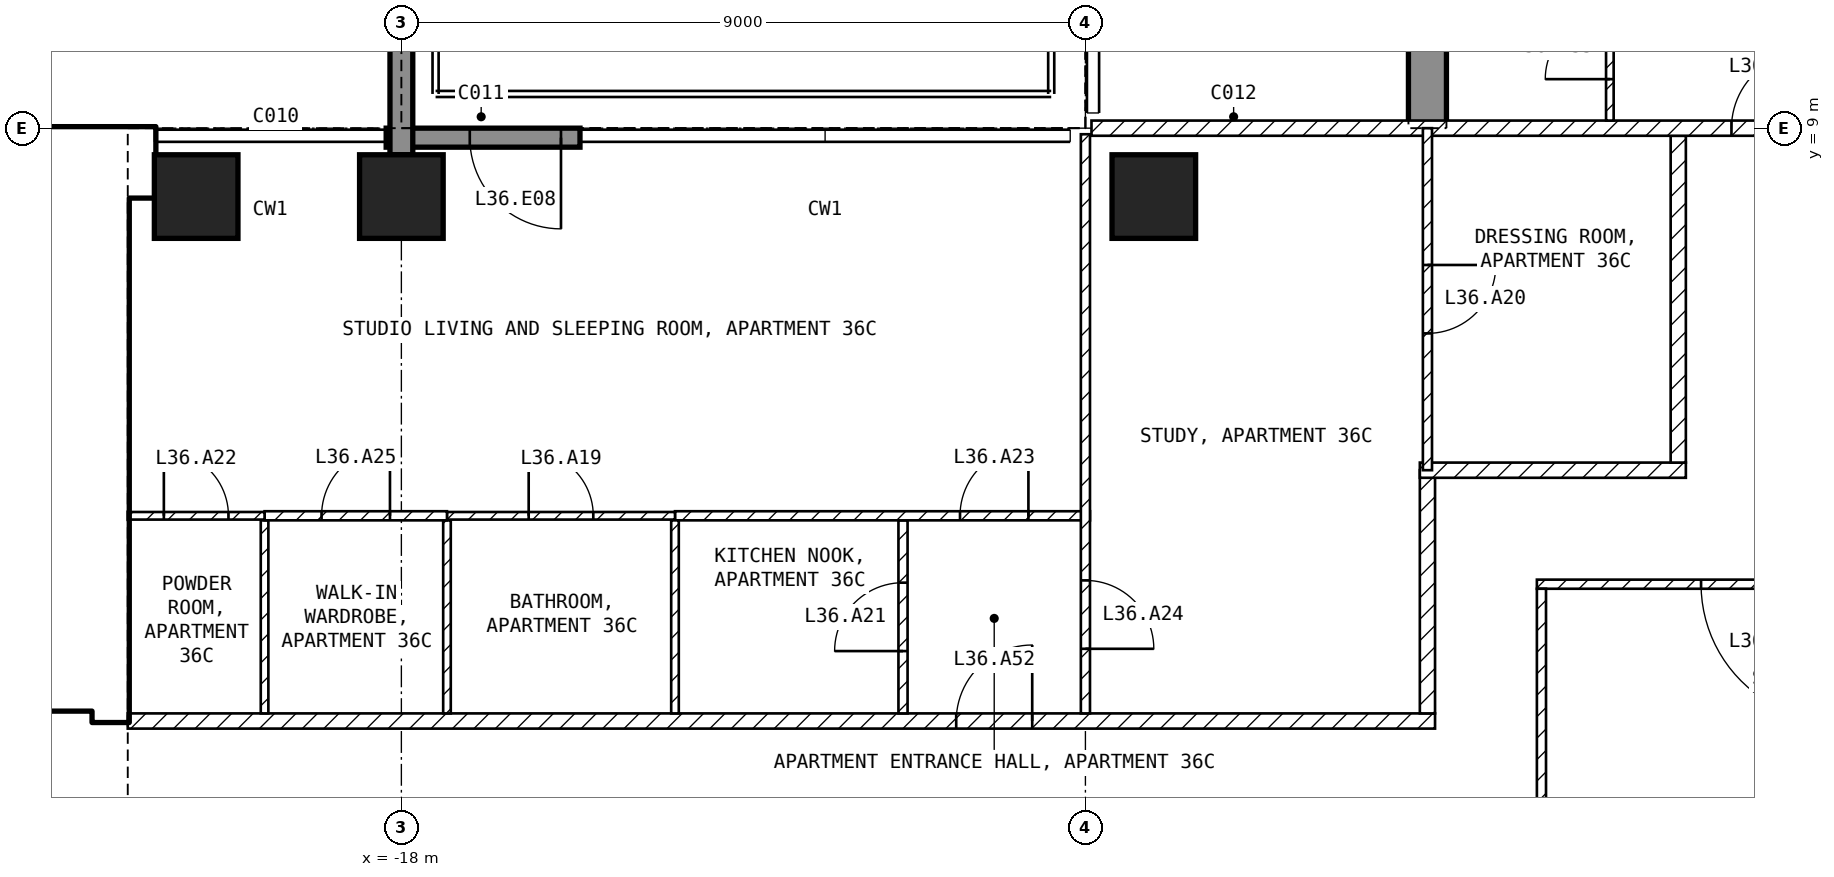
"""IFC4 building model, lengths in metres.
Left out: names, types, materials, properties, quantities, classifications, styles, units other than length and angle.
Written with IfcOpenShell. Run it as: python <this file> out.ifc"""

import sys

from ifc_helpers import new_model, si_unit, direction, frame, frame_2d, origin, origin_2d, place, context, subcontext, project, spatial, polyline, rectangle, outline, extrude, element, fill, save


model = new_model("IFC4")
c1 = context("Model", 3, precision=1e-05, world=origin(), true_north=direction((0.0, 1.0)))
c2 = subcontext(c1, "Body", "Model", "MODEL_VIEW")
j1 = project(units=[si_unit("LENGTHUNIT", "METRE"), si_unit("PLANEANGLEUNIT", "RADIAN")], contexts=[c1])
p1 = place(None, origin())
s1 = spatial("IfcSite", under=j1, at=p1, CompositionType="ELEMENT")
p2 = place(p1, origin())
s2 = spatial("IfcBuilding", under=s1, at=p2, CompositionType="ELEMENT")
p3 = place(p2, frame((0.0, 0.0, 147.9)))
s3 = spatial("IfcBuildingStorey", under=s2, at=p3, CompositionType="ELEMENT", Elevation=147.9)
for number, where, z_axis, x_axis in (
    (1, (-20.7, 8.1, -0.25), (0.0, 0.0, 1.0), (1.0, 0.0, 0.0)),
    (2, (-18.0, 8.1, -0.25), (0.0, 0.0, 1.0), (1.0, 0.0, 0.0)),
    (3, (-8.1, 8.1, -0.25), (0.0, 0.0, 1.0), (1.0, 0.0, 0.0)),
):
    element("IfcColumn", number, at=place(p3, frame(where, z_axis=z_axis, x_axis=x_axis)), inside=s3, PredefinedType="COLUMN", context=c2, shape_type="SweptSolid", body=[
        extrude(rectangle(XDim=1.1, YDim=1.1, at=origin_2d()), origin(), (0.0, 0.0, 1.0), 3.5),
    ])
p4 = place(p3, frame((-4.75, 9.0, -0.25), z_axis=(1.0, 0.0, 0.0), x_axis=(0.0, 1.0, 0.0)))
e4 = element("IfcWall", 4, at=p4, inside=s3, PredefinedType="SHEAR", context=c2, shape_type="SweptSolid", body=[
    extrude(outline(polyline([(0.0, 0.0), (2.1, 0.0), (2.1, 2.65), (4.5, 2.65), (4.5, 0.0), (9.9, 0.0), (9.9, 2.65), (12.3, 2.65), (12.3, 0.0), (16.55, 0.0), (16.55, 3.5), (0.0, 3.5), (0.0, 0.0)])), origin(), (0.0, 0.0, 1.0), 0.5),
])
p5 = place(p3, frame((-15.65, 8.875, 0.0), z_axis=(0.0, 0.0, 1.0), x_axis=(-1.0, 0.0, 0.0)))
e5 = element("IfcWall", 5, at=p5, inside=s3, PredefinedType="SOLIDWALL", context=c2, shape_type="SweptSolid", body=[
    extrude(rectangle(XDim=2.55, YDim=0.25, at=frame_2d((1.275, 0.0))), origin(), (0.0, 0.0, 1.0), 3.25),
])
p6 = place(p5, frame((0.25, 0.0, 0.0)))
e6 = element("IfcOpeningElement", 6, at=p6, cuts=e5, PredefinedType="OPENING", context=c2, shape_type="SweptSolid", body=[
    extrude(rectangle(XDim=1.2, YDim=2.4, at=frame_2d((0.6, 1.2))), frame((0.0, 0.135, 0.0), z_axis=(0.0, -1.0, 0.0), x_axis=(1.0, 0.0, 0.0)), (0.0, 0.0, 1.0), 0.27),
])
p7 = place(p3, frame((-18.0, 8.65, 0.0), z_axis=(0.0, 0.0, 1.0), x_axis=(0.0, 1.0, 0.0)))
e7 = element("IfcWall", 7, at=p7, inside=s3, PredefinedType="SOLIDWALL", context=c2, shape_type="SweptSolid", body=[
    extrude(rectangle(XDim=3.09, YDim=0.3, at=frame_2d((1.545, 0.0))), origin(), (0.0, 0.0, 1.0), 3.25),
])
p8 = place(p3, frame((-29.45, 8.55, 0.0), z_axis=(0.0, 0.0, 1.0), x_axis=(1.0, 0.0, 0.0)))
e8 = element("IfcWall", 8, at=p8, inside=s3, PredefinedType="SHEAR", context=c2, shape_type="SweptSolid", body=[
    extrude(rectangle(XDim=8.2, YDim=0.9, at=frame_2d((4.1, 0.0))), origin(), (0.0, 0.0, 1.0), 3.25),
])
p9 = place(p3, frame((-21.825, 1.2, 0.0), z_axis=(0.0, 0.0, 1.0), x_axis=(0.0, 1.0, 0.0)))
e9 = element("IfcWall", 9, at=p9, inside=s3, PredefinedType="SHEAR", context=c2, shape_type="SweptSolid", body=[
    extrude(rectangle(XDim=6.9, YDim=0.45, at=frame_2d((3.45, 0.0))), origin(), (0.0, 0.0, 1.0), 3.25),
])
p10 = place(p3, frame((-33.05, 1.45, 0.0), z_axis=(0.0, 0.0, 1.0), x_axis=(1.0, 0.0, 0.0)))
e10 = element("IfcWall", 10, at=p10, inside=s3, PredefinedType="SOLIDWALL", context=c2, shape_type="SweptSolid", body=[
    extrude(rectangle(XDim=11.0, YDim=0.2, at=frame_2d((5.5, 0.0))), origin(), (0.0, 0.0, 1.0), 3.25),
])
p11 = place(p10, frame((9.25, 0.0, 0.0)))
e11 = element("IfcOpeningElement", 11, at=p11, cuts=e10, PredefinedType="OPENING", context=c2, shape_type="SweptSolid", body=[
    extrude(rectangle(XDim=1.0, YDim=2.1, at=frame_2d((0.5, 1.05))), frame((0.0, 0.11, 0.0), z_axis=(0.0, -1.0, 0.0), x_axis=(1.0, 0.0, 0.0)), (0.0, 0.0, 1.0), 0.22),
])
p12 = place(p10, frame((6.75, 0.0, 0.0)))
e12 = element("IfcOpeningElement", 12, at=p12, cuts=e10, PredefinedType="OPENING", context=c2, shape_type="SweptSolid", body=[
    extrude(rectangle(XDim=1.0, YDim=2.1, at=frame_2d((0.5, 1.05))), frame((0.0, 0.11, 0.0), z_axis=(0.0, -1.0, 0.0), x_axis=(1.0, 0.0, 0.0)), (0.0, 0.0, 1.0), 0.22),
])
p13 = place(p10, frame((1.025, 0.0, 0.0)))
e13 = element("IfcOpeningElement", 13, at=p13, cuts=e10, PredefinedType="OPENING", context=c2, shape_type="SweptSolid", body=[
    extrude(rectangle(XDim=0.9, YDim=2.1, at=frame_2d((0.45, 1.05))), frame((0.0, 0.11, 0.0), z_axis=(0.0, -1.0, 0.0), x_axis=(1.0, 0.0, 0.0)), (0.0, 0.0, 1.0), 0.22),
])
p14 = place(p3, frame((-28.35, 5.15, 0.0), z_axis=(0.0, 0.0, 1.0), x_axis=(1.0, 0.0, 0.0)))
e14 = element("IfcWall", 14, at=p14, inside=s3, PredefinedType="SOLIDWALL", context=c2, shape_type="SweptSolid", body=[
    extrude(rectangle(XDim=6.3, YDim=0.2, at=frame_2d((3.15, 0.0))), origin(), (0.0, 0.0, 1.0), 3.25),
])
p15 = place(p14, frame((5.1, 0.0, 0.0)))
e15 = element("IfcOpeningElement", 15, at=p15, cuts=e14, PredefinedType="OPENING", context=c2, shape_type="SweptSolid", body=[
    extrude(rectangle(XDim=1.0, YDim=2.1, at=frame_2d((0.5, 1.05))), frame((0.0, 0.11, 0.0), z_axis=(0.0, -1.0, 0.0), x_axis=(1.0, 0.0, 0.0)), (0.0, 0.0, 1.0), 0.22),
])
p16 = place(p3, frame((3.06, 3.0, 0.0), z_axis=(0.0, 0.0, 1.0), x_axis=(-1.0, 0.0, 0.0)))
e16 = element("IfcWall", 16, at=p16, inside=s3, PredefinedType="PARTITIONING", context=c2, shape_type="SweptSolid", body=[
    extrude(rectangle(XDim=6.12, YDim=0.12, at=frame_2d((3.06, 0.0))), origin(), (0.0, 0.0, 1.0), 3.25),
])
p17 = place(p16, frame((2.16, 0.0, 0.0)))
e17 = element("IfcOpeningElement", 17, at=p17, cuts=e16, PredefinedType="OPENING", context=c2, shape_type="SweptSolid", body=[
    extrude(rectangle(XDim=1.8, YDim=2.1, at=frame_2d((0.9, 1.05))), frame((0.0, 0.07, 0.0), z_axis=(0.0, -1.0, 0.0), x_axis=(1.0, 0.0, 0.0)), (0.0, 0.0, 1.0), 0.14),
])
p18 = place(p3, frame((-3.0, 2.94, 0.0), z_axis=(0.0, 0.0, 1.0), x_axis=(0.0, -1.0, 0.0)))
e18 = element("IfcWall", 18, at=p18, inside=s3, PredefinedType="PARTITIONING", context=c2, shape_type="SweptSolid", body=[
    extrude(rectangle(XDim=5.88, YDim=0.12, at=frame_2d((2.94, 0.0))), origin(), (0.0, 0.0, 1.0), 3.25),
])
p19 = place(p3, frame((-21.6, 1.2, 0.0), z_axis=(0.0, 0.0, 1.0), x_axis=(1.0, 0.0, 0.0)))
e19 = element("IfcWall", 19, at=p19, inside=s3, PredefinedType="PARTITIONING", context=c2, shape_type="SweptSolid", body=[
    extrude(rectangle(XDim=17.2, YDim=0.2, at=frame_2d((8.6, 0.0))), origin(), (0.0, 0.0, 1.0), 3.25),
])
p20 = place(p19, frame((10.9, 0.0, 0.0)))
e20 = element("IfcOpeningElement", 20, at=p20, cuts=e19, PredefinedType="OPENING", context=c2, shape_type="SweptSolid", body=[
    extrude(rectangle(XDim=1.0, YDim=2.1, at=frame_2d((0.5, 1.05))), frame((0.0, 0.11, 0.0), z_axis=(0.0, -1.0, 0.0), x_axis=(1.0, 0.0, 0.0)), (0.0, 0.0, 1.0), 0.22),
])
p21 = place(p3, frame((-4.5, 1.3, 0.0), z_axis=(0.0, 0.0, 1.0), x_axis=(0.0, 1.0, 0.0)))
e21 = element("IfcWall", 21, at=p21, inside=s3, PredefinedType="PARTITIONING", context=c2, shape_type="SweptSolid", body=[
    extrude(rectangle(XDim=3.2, YDim=0.2, at=frame_2d((1.6, 0.0))), origin(), (0.0, 0.0, 1.0), 3.25),
])
p22 = place(p3, frame((-4.6, 4.5, 0.0), z_axis=(0.0, 0.0, 1.0), x_axis=(1.0, 0.0, 0.0)))
e22 = element("IfcWall", 22, at=p22, inside=s3, PredefinedType="PARTITIONING", context=c2, shape_type="SweptSolid", body=[
    extrude(rectangle(XDim=3.5, YDim=0.2, at=frame_2d((1.75, 0.0))), origin(), (0.0, 0.0, 1.0), 3.25),
])
p23 = place(p3, frame((-1.2, 4.6, 0.0), z_axis=(0.0, 0.0, 1.0), x_axis=(0.0, 1.0, 0.0)))
e23 = element("IfcWall", 23, at=p23, inside=s3, PredefinedType="PARTITIONING", context=c2, shape_type="SweptSolid", body=[
    extrude(rectangle(XDim=4.3, YDim=0.2, at=frame_2d((2.15, 0.0))), origin(), (0.0, 0.0, 1.0), 3.25),
])
p24 = place(p3, frame((-8.92, 9.0, 0.0), z_axis=(0.0, 0.0, 1.0), x_axis=(1.0, 0.0, 0.0)))
e24 = element("IfcWall", 24, at=p24, inside=s3, PredefinedType="PARTITIONING", context=c2, shape_type="SweptSolid", body=[
    extrude(rectangle(XDim=17.84, YDim=0.2, at=frame_2d((8.92, 0.0))), origin(), (0.0, 0.0, 1.0), 3.25),
])
p25 = place(p24, frame((8.42, 0.0, 0.0)))
e25 = element("IfcOpeningElement", 25, at=p25, cuts=e24, PredefinedType="OPENING", context=c2, shape_type="SweptSolid", body=[
    extrude(rectangle(XDim=1.0, YDim=2.1, at=frame_2d((0.5, 1.05))), frame((0.0, 0.11, 0.0), z_axis=(0.0, -1.0, 0.0), x_axis=(1.0, 0.0, 0.0)), (0.0, 0.0, 1.0), 0.22),
])
p26 = place(p3, frame((-11.4, 1.3, 0.0), z_axis=(0.0, 0.0, 1.0), x_axis=(0.0, 1.0, 0.0)))
e26 = element("IfcWall", 26, at=p26, inside=s3, PredefinedType="PARTITIONING", context=c2, shape_type="SweptSolid", body=[
    extrude(rectangle(XDim=2.54, YDim=0.12, at=frame_2d((1.27, 0.0))), origin(), (0.0, 0.0, 1.0), 3.25),
])
p27 = place(p26, frame((0.82, 0.0, 0.0)))
e27 = element("IfcOpeningElement", 27, at=p27, cuts=e26, PredefinedType="OPENING", context=c2, shape_type="SweptSolid", body=[
    extrude(rectangle(XDim=0.9, YDim=2.1, at=frame_2d((0.45, 1.05))), frame((0.0, 0.07, 0.0), z_axis=(0.0, -1.0, 0.0), x_axis=(1.0, 0.0, 0.0)), (0.0, 0.0, 1.0), 0.14),
])
p28 = place(p3, frame((-14.4, 3.9, 0.0), z_axis=(0.0, 0.0, 1.0), x_axis=(1.0, 0.0, 0.0)))
e28 = element("IfcWall", 28, at=p28, inside=s3, PredefinedType="PARTITIONING", context=c2, shape_type="SweptSolid", body=[
    extrude(rectangle(XDim=5.46, YDim=0.12, at=frame_2d((2.73, 0.0))), origin(), (0.0, 0.0, 1.0), 3.25),
])
p29 = place(p28, frame((3.75, 0.0, 0.0)))
e29 = element("IfcOpeningElement", 29, at=p29, cuts=e28, PredefinedType="OPENING", context=c2, shape_type="SweptSolid", body=[
    extrude(rectangle(XDim=0.9, YDim=2.1, at=frame_2d((0.45, 1.05))), frame((0.0, 0.07, 0.0), z_axis=(0.0, -1.0, 0.0), x_axis=(1.0, 0.0, 0.0)), (0.0, 0.0, 1.0), 0.14),
])
p30 = place(p3, frame((-9.0, 8.92, 0.0), z_axis=(0.0, 0.0, 1.0), x_axis=(0.0, -1.0, 0.0)))
e30 = element("IfcWall", 30, at=p30, inside=s3, PredefinedType="PARTITIONING", context=c2, shape_type="SweptSolid", body=[
    extrude(rectangle(XDim=7.62, YDim=0.12, at=frame_2d((3.81, 0.0))), origin(), (0.0, 0.0, 1.0), 3.25),
])
p31 = place(p30, frame((5.87, 0.0, 0.0)))
e31 = element("IfcOpeningElement", 31, at=p31, cuts=e30, PredefinedType="OPENING", context=c2, shape_type="SweptSolid", body=[
    extrude(rectangle(XDim=0.9, YDim=2.1, at=frame_2d((0.45, 1.05))), frame((0.0, 0.07, 0.0), z_axis=(0.0, -1.0, 0.0), x_axis=(1.0, 0.0, 0.0)), (0.0, 0.0, 1.0), 0.14),
])
for number, where, z_axis, x_axis in (
    (32, (-14.4, 1.3, 0.0), (0.0, 0.0, 1.0), (0.0, 1.0, 0.0)),
    (33, (-17.4, 1.3, 0.0), (0.0, 0.0, 1.0), (0.0, 1.0, 0.0)),
):
    element("IfcWall", number, at=place(p3, frame(where, z_axis=z_axis, x_axis=x_axis)), inside=s3, PredefinedType="PARTITIONING", context=c2, shape_type="SweptSolid", body=[
        extrude(rectangle(XDim=2.54, YDim=0.1, at=frame_2d((1.27, 0.0))), origin(), (0.0, 0.0, 1.0), 3.25),
    ])
p32 = place(p3, frame((-17.4, 3.9, 0.0), z_axis=(0.0, 0.0, 1.0), x_axis=(1.0, 0.0, 0.0)))
e34 = element("IfcWall", 34, at=p32, inside=s3, PredefinedType="PARTITIONING", context=c2, shape_type="SweptSolid", body=[
    extrude(rectangle(XDim=3.0, YDim=0.1, at=frame_2d((1.5, 0.0))), origin(), (0.0, 0.0, 1.0), 3.25),
])
p33 = place(p32, frame((1.075, 0.0, 0.0)))
e35 = element("IfcOpeningElement", 35, at=p33, cuts=e34, PredefinedType="OPENING", context=c2, shape_type="SweptSolid", body=[
    extrude(rectangle(XDim=0.85, YDim=2.1, at=frame_2d((0.425, 1.05))), frame((0.0, 0.06, 0.0), z_axis=(0.0, -1.0, 0.0), x_axis=(1.0, 0.0, 0.0)), (0.0, 0.0, 1.0), 0.12),
])
p34 = place(p3, frame((-19.8, 1.3, 0.0), z_axis=(0.0, 0.0, 1.0), x_axis=(0.0, 1.0, 0.0)))
e36 = element("IfcWall", 36, at=p34, inside=s3, PredefinedType="PARTITIONING", context=c2, shape_type="SweptSolid", body=[
    extrude(rectangle(XDim=2.54, YDim=0.1, at=frame_2d((1.27, 0.0))), origin(), (0.0, 0.0, 1.0), 3.25),
])
p35 = place(p3, frame((-19.8, 3.9, 0.0), z_axis=(0.0, 0.0, 1.0), x_axis=(1.0, 0.0, 0.0)))
e37 = element("IfcWall", 37, at=p35, inside=s3, PredefinedType="PARTITIONING", context=c2, shape_type="SweptSolid", body=[
    extrude(rectangle(XDim=2.4, YDim=0.12, at=frame_2d((1.2, 0.0))), origin(), (0.0, 0.0, 1.0), 3.25),
])
p36 = place(p35, frame((0.75, 0.0, 0.0)))
e38 = element("IfcOpeningElement", 38, at=p36, cuts=e37, PredefinedType="OPENING", context=c2, shape_type="SweptSolid", body=[
    extrude(rectangle(XDim=0.9, YDim=2.1, at=frame_2d((0.45, 1.05))), frame((0.0, 0.07, 0.0), z_axis=(0.0, -1.0, 0.0), x_axis=(1.0, 0.0, 0.0)), (0.0, 0.0, 1.0), 0.14),
])
p37 = place(p3, frame((-21.6, 3.9, 0.0), z_axis=(0.0, 0.0, 1.0), x_axis=(1.0, 0.0, 0.0)))
e39 = element("IfcWall", 39, at=p37, inside=s3, PredefinedType="PARTITIONING", context=c2, shape_type="SweptSolid", body=[
    extrude(rectangle(XDim=1.8, YDim=0.1, at=frame_2d((0.9, 0.0))), origin(), (0.0, 0.0, 1.0), 3.25),
])
p38 = place(p37, frame((0.475, 0.0, 0.0)))
e40 = element("IfcOpeningElement", 40, at=p38, cuts=e39, PredefinedType="OPENING", context=c2, shape_type="SweptSolid", body=[
    extrude(rectangle(XDim=0.85, YDim=2.1, at=frame_2d((0.425, 1.05))), frame((0.0, 0.06, 0.0), z_axis=(0.0, -1.0, 0.0), x_axis=(1.0, 0.0, 0.0)), (0.0, 0.0, 1.0), 0.12),
])
p39 = place(p3, frame((-4.5, 9.0, 0.0), z_axis=(0.0, 0.0, 1.0), x_axis=(0.0, -1.0, 0.0)))
e41 = element("IfcWall", 41, at=p39, inside=s3, PredefinedType="PARTITIONING", context=c2, shape_type="SweptSolid", body=[
    extrude(rectangle(XDim=4.5, YDim=0.12, at=frame_2d((2.25, 0.0))), origin(), (0.0, 0.0, 1.0), 3.25),
])
p40 = place(p39, frame((1.8, 0.0, 0.0)))
e42 = element("IfcOpeningElement", 42, at=p40, cuts=e41, PredefinedType="OPENING", context=c2, shape_type="SweptSolid", body=[
    extrude(rectangle(XDim=0.9, YDim=2.1, at=frame_2d((0.45, 1.05))), frame((0.0, 0.07, 0.0), z_axis=(0.0, -1.0, 0.0), x_axis=(1.0, 0.0, 0.0)), (0.0, 0.0, 1.0), 0.14),
])
p41 = place(p3, frame((-2.1, 9.1, 0.0), z_axis=(0.0, 0.0, 1.0), x_axis=(0.0, 1.0, 0.0)))
e43 = element("IfcWall", 43, at=p41, inside=s3, PredefinedType="PARTITIONING", context=c2, shape_type="SweptSolid", body=[
    extrude(rectangle(XDim=1.94, YDim=0.1, at=frame_2d((0.97, 0.0))), origin(), (0.0, 0.0, 1.0), 3.25),
])
p42 = place(p41, frame((0.545, 0.0, 0.0)))
e44 = element("IfcOpeningElement", 44, at=p42, cuts=e43, PredefinedType="OPENING", context=c2, shape_type="SweptSolid", body=[
    extrude(rectangle(XDim=0.85, YDim=2.1, at=frame_2d((0.425, 1.05))), frame((0.0, 0.06, 0.0), z_axis=(0.0, -1.0, 0.0), x_axis=(1.0, 0.0, 0.0)), (0.0, 0.0, 1.0), 0.12),
])
p43 = place(p6, origin())
e45 = element("IfcDoor", 45, at=p43, inside=s3, OperationType="SINGLE_SWING_LEFT", PredefinedType="DOOR", context=c2, shape_type="SweptSolid", body=[
    extrude(rectangle(XDim=1.2, YDim=2.4, at=frame_2d((0.6, 1.2))), frame((0.0, 0.025, 0.0), z_axis=(0.0, -1.0, 0.0), x_axis=(1.0, 0.0, 0.0)), (0.0, 0.0, 1.0), 0.05),
])
fill(e6, e45)
p44 = place(p15, origin())
e46 = element("IfcDoor", 46, at=p44, inside=s3, OperationType="SINGLE_SWING_LEFT", PredefinedType="DOOR", context=c2, shape_type="SweptSolid", body=[
    extrude(rectangle(XDim=1.0, YDim=2.1, at=frame_2d((0.5, 1.05))), frame((0.0, 0.025, 0.0), z_axis=(0.0, -1.0, 0.0), x_axis=(1.0, 0.0, 0.0)), (0.0, 0.0, 1.0), 0.05),
])
fill(e15, e46)
p45 = place(p17, origin())
e47 = element("IfcDoor", 47, at=p45, inside=s3, OperationType="SINGLE_SWING_LEFT", PredefinedType="DOOR", context=c2, shape_type="SweptSolid", body=[
    extrude(rectangle(XDim=1.8, YDim=2.1, at=frame_2d((0.9, 1.05))), frame((0.0, 0.025, 0.0), z_axis=(0.0, -1.0, 0.0), x_axis=(1.0, 0.0, 0.0)), (0.0, 0.0, 1.0), 0.05),
])
fill(e17, e47)
p46 = place(p33, origin())
e48 = element("IfcDoor", 48, at=p46, inside=s3, OperationType="SINGLE_SWING_LEFT", PredefinedType="DOOR", context=c2, shape_type="SweptSolid", body=[
    extrude(rectangle(XDim=0.85, YDim=2.1, at=frame_2d((0.425, 1.05))), frame((0.0, 0.025, 0.0), z_axis=(0.0, -1.0, 0.0), x_axis=(1.0, 0.0, 0.0)), (0.0, 0.0, 1.0), 0.05),
])
fill(e35, e48)
p47 = place(p40, origin())
e49 = element("IfcDoor", 49, at=p47, inside=s3, OperationType="SINGLE_SWING_LEFT", PredefinedType="DOOR", context=c2, shape_type="SweptSolid", body=[
    extrude(rectangle(XDim=0.9, YDim=2.1, at=frame_2d((0.45, 1.05))), frame((0.0, 0.025, 0.0), z_axis=(0.0, -1.0, 0.0), x_axis=(1.0, 0.0, 0.0)), (0.0, 0.0, 1.0), 0.05),
])
fill(e42, e49)
p48 = place(p27, origin())
e50 = element("IfcDoor", 50, at=p48, inside=s3, OperationType="SINGLE_SWING_LEFT", PredefinedType="DOOR", context=c2, shape_type="SweptSolid", body=[
    extrude(rectangle(XDim=0.9, YDim=2.1, at=frame_2d((0.45, 1.05))), frame((0.0, 0.025, 0.0), z_axis=(0.0, -1.0, 0.0), x_axis=(1.0, 0.0, 0.0)), (0.0, 0.0, 1.0), 0.05),
])
fill(e27, e50)
p49 = place(p38, origin())
e51 = element("IfcDoor", 51, at=p49, inside=s3, OperationType="SINGLE_SWING_LEFT", PredefinedType="DOOR", context=c2, shape_type="SweptSolid", body=[
    extrude(rectangle(XDim=0.85, YDim=2.1, at=frame_2d((0.425, 1.05))), frame((0.0, 0.025, 0.0), z_axis=(0.0, -1.0, 0.0), x_axis=(1.0, 0.0, 0.0)), (0.0, 0.0, 1.0), 0.05),
])
fill(e40, e51)
p50 = place(p29, origin())
e52 = element("IfcDoor", 52, at=p50, inside=s3, OperationType="SINGLE_SWING_RIGHT", PredefinedType="DOOR", context=c2, shape_type="SweptSolid", body=[
    extrude(rectangle(XDim=0.9, YDim=2.1, at=frame_2d((0.45, 1.05))), frame((0.0, 0.025, 0.0), z_axis=(0.0, -1.0, 0.0), x_axis=(1.0, 0.0, 0.0)), (0.0, 0.0, 1.0), 0.05),
])
fill(e29, e52)
p51 = place(p31, origin())
e53 = element("IfcDoor", 53, at=p51, inside=s3, OperationType="SINGLE_SWING_RIGHT", PredefinedType="DOOR", context=c2, shape_type="SweptSolid", body=[
    extrude(rectangle(XDim=0.9, YDim=2.1, at=frame_2d((0.45, 1.05))), frame((0.0, 0.025, 0.0), z_axis=(0.0, -1.0, 0.0), x_axis=(1.0, 0.0, 0.0)), (0.0, 0.0, 1.0), 0.05),
])
fill(e31, e53)
p52 = place(p36, origin())
e54 = element("IfcDoor", 54, at=p52, inside=s3, OperationType="SINGLE_SWING_RIGHT", PredefinedType="DOOR", context=c2, shape_type="SweptSolid", body=[
    extrude(rectangle(XDim=0.9, YDim=2.1, at=frame_2d((0.45, 1.05))), frame((0.0, 0.025, 0.0), z_axis=(0.0, -1.0, 0.0), x_axis=(1.0, 0.0, 0.0)), (0.0, 0.0, 1.0), 0.05),
])
fill(e38, e54)
p53 = place(p25, origin())
e55 = element("IfcDoor", 55, at=p53, inside=s3, OperationType="SINGLE_SWING_RIGHT", PredefinedType="DOOR", context=c2, shape_type="SweptSolid", body=[
    extrude(rectangle(XDim=1.0, YDim=2.1, at=frame_2d((0.5, 1.05))), frame((0.0, 0.025, 0.0), z_axis=(0.0, -1.0, 0.0), x_axis=(1.0, 0.0, 0.0)), (0.0, 0.0, 1.0), 0.05),
])
fill(e25, e55)
p54 = place(p42, origin())
e56 = element("IfcDoor", 56, at=p54, inside=s3, OperationType="SINGLE_SWING_LEFT", PredefinedType="DOOR", context=c2, shape_type="SweptSolid", body=[
    extrude(rectangle(XDim=0.85, YDim=2.1, at=frame_2d((0.425, 1.05))), frame((0.0, 0.025, 0.0), z_axis=(0.0, -1.0, 0.0), x_axis=(1.0, 0.0, 0.0)), (0.0, 0.0, 1.0), 0.05),
])
fill(e44, e56)
p55 = place(p20, origin())
e57 = element("IfcDoor", 57, at=p55, inside=s3, OperationType="SINGLE_SWING_RIGHT", PredefinedType="DOOR", context=c2, shape_type="SweptSolid", body=[
    extrude(rectangle(XDim=1.0, YDim=2.1, at=frame_2d((0.5, 1.05))), frame((0.0, 0.025, 0.0), z_axis=(0.0, -1.0, 0.0), x_axis=(1.0, 0.0, 0.0)), (0.0, 0.0, 1.0), 0.05),
])
fill(e20, e57)
save(model, sys.argv[1])
